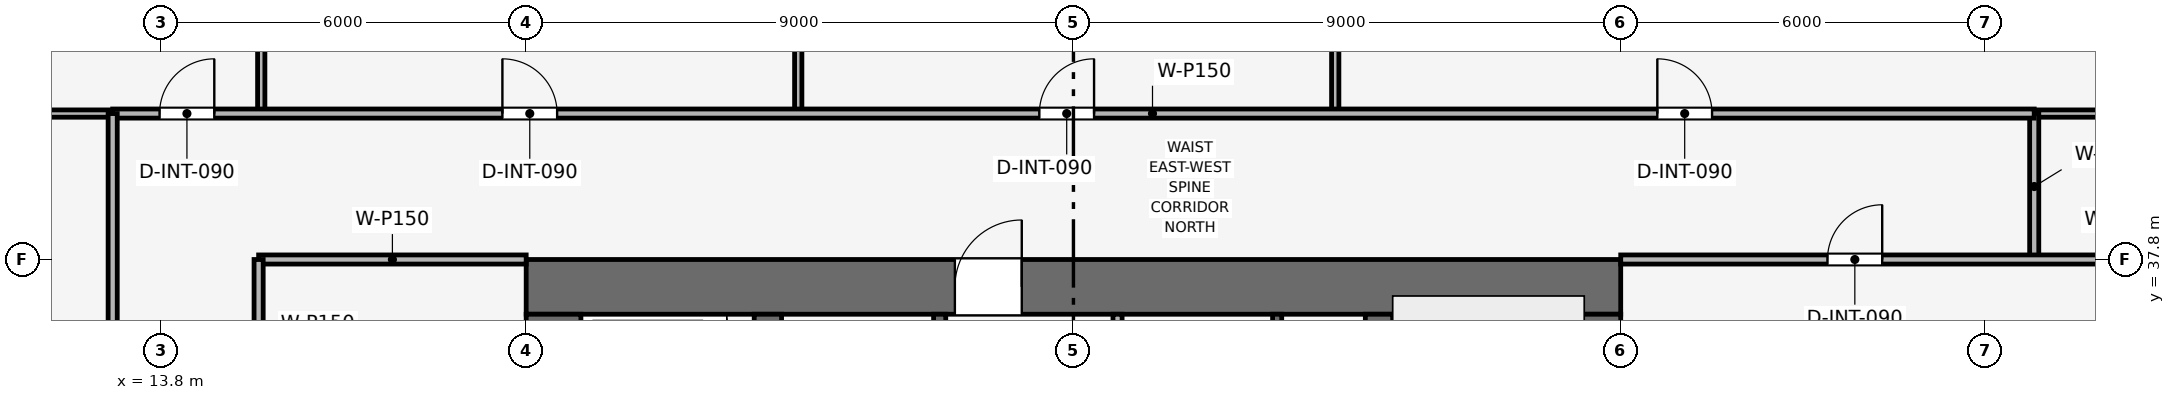
"""IFC4 building model, lengths in metres.
Left out: names, types, materials, properties, quantities, classifications, styles, units other than length and angle.
Written with IfcOpenShell. Run it as: python <this file> out.ifc"""

import sys

from ifc_helpers import new_model, si_unit, direction, frame, frame_2d, origin, place, context, subcontext, project, spatial, rectangle, extrude, element, fill, save


model = new_model("IFC4")
c1 = context("Model", 3, precision=1e-05, world=origin(), true_north=direction((0.0, 1.0)))
c2 = subcontext(c1, "Body", "Model", "MODEL_VIEW")
j1 = project(units=[si_unit("LENGTHUNIT", "METRE"), si_unit("PLANEANGLEUNIT", "RADIAN")], contexts=[c1])
p1 = place(None, origin())
s1 = spatial("IfcSite", under=j1, at=p1, CompositionType="ELEMENT")
p2 = place(p1, origin())
s2 = spatial("IfcBuilding", under=s1, at=p2, CompositionType="ELEMENT")
p3 = place(p2, frame((0.0, 0.0, 145.8)))
s3 = spatial("IfcBuildingStorey", under=s2, at=p3, CompositionType="ELEMENT", Elevation=145.8)
p4 = place(p3, frame((19.8, 37.35, 0.0), z_axis=(0.0, 0.0, 1.0), x_axis=(1.0, 0.0, 0.0)))
e1 = element("IfcWall", 1, at=p4, inside=s3, PredefinedType="SHEAR", context=c2, shape_type="SweptSolid", body=[
    extrude(rectangle(XDim=18.0, YDim=0.9, at=frame_2d((9.0, 0.0))), origin(), (0.0, 0.0, 1.0), 3.75),
])
p5 = place(p4, frame((7.05, 0.0, 0.0)))
e2 = element("IfcOpeningElement", 2, at=p5, cuts=e1, PredefinedType="OPENING", context=c2, shape_type="SweptSolid", body=[
    extrude(rectangle(XDim=1.1, YDim=2.15, at=frame_2d((0.55, 1.075))), frame((0.0, 0.46, 0.0), z_axis=(0.0, -1.0, 0.0), x_axis=(1.0, 0.0, 0.0)), (0.0, 0.0, 1.0), 0.92),
])
p6 = place(p3, frame((20.25, 20.7, 0.0), z_axis=(0.0, 0.0, 1.0), x_axis=(0.0, 1.0, 0.0)))
e3 = element("IfcWall", 3, at=p6, inside=s3, PredefinedType="SHEAR", context=c2, shape_type="SweptSolid", body=[
    extrude(rectangle(XDim=16.2, YDim=0.9, at=frame_2d((8.1, 0.0))), origin(), (0.0, 0.0, 1.0), 3.75),
])
p7 = place(p6, frame((10.1, 0.0, 0.0)))
e4 = element("IfcOpeningElement", 4, at=p7, cuts=e3, PredefinedType="OPENING", context=c2, shape_type="SweptSolid", body=[
    extrude(rectangle(XDim=1.1, YDim=2.15, at=frame_2d((0.55, 1.075))), frame((0.0, 0.46, 0.0), z_axis=(0.0, -1.0, 0.0), x_axis=(1.0, 0.0, 0.0)), (0.0, 0.0, 1.0), 0.92),
])
p8 = place(p3, frame((37.35, 20.7, 0.0), z_axis=(0.0, 0.0, 1.0), x_axis=(0.0, 1.0, 0.0)))
e5 = element("IfcWall", 5, at=p8, inside=s3, PredefinedType="SHEAR", context=c2, shape_type="SweptSolid", body=[
    extrude(rectangle(XDim=16.2, YDim=0.9, at=frame_2d((8.1, 0.0))), origin(), (0.0, 0.0, 1.0), 3.75),
])
p9 = place(p8, frame((4.6, 0.0, 0.0)))
e6 = element("IfcOpeningElement", 6, at=p9, cuts=e5, PredefinedType="OPENING", context=c2, shape_type="SweptSolid", body=[
    extrude(rectangle(XDim=1.1, YDim=2.15, at=frame_2d((0.55, 1.075))), frame((0.0, 0.46, 0.0), z_axis=(0.0, -1.0, 0.0), x_axis=(1.0, 0.0, 0.0)), (0.0, 0.0, 1.0), 0.92),
])
for number, where, z_axis, x_axis in (
    (7, (23.775, 20.7, 0.0), (0.0, 0.0, 1.0), (0.0, 1.0, 0.0)),
    (8, (33.825, 20.7, 0.0), (0.0, 0.0, 1.0), (0.0, 1.0, 0.0)),
):
    element("IfcWall", number, at=place(p3, frame(where, z_axis=z_axis, x_axis=x_axis)), inside=s3, PredefinedType="SHEAR", context=c2, shape_type="SweptSolid", body=[
        extrude(rectangle(XDim=16.2, YDim=0.45, at=frame_2d((8.1, 0.0))), origin(), (0.0, 0.0, 1.0), 3.75),
    ])
p10 = place(p3, frame((32.15, 34.0, 0.0), z_axis=(0.0, 0.0, 1.0), x_axis=(0.0, 1.0, 0.0)))
e9 = element("IfcWall", 9, at=p10, inside=s3, PredefinedType="SHEAR", context=c2, shape_type="SweptSolid", body=[
    extrude(rectangle(XDim=2.9, YDim=0.15, at=frame_2d((1.45, 0.0))), origin(), (0.0, 0.0, 1.0), 3.495),
])
p11 = place(p3, frame((26.6, 34.0, 0.0), z_axis=(0.0, 0.0, 1.0), x_axis=(0.0, 1.0, 0.0)))
e10 = element("IfcWall", 10, at=p11, inside=s3, PredefinedType="SHEAR", context=c2, shape_type="SweptSolid", body=[
    extrude(rectangle(XDim=2.9, YDim=0.2, at=frame_2d((1.45, 0.0))), origin(), (0.0, 0.0, 1.0), 3.495),
])
p12 = place(p11, frame((0.75, 0.0, 0.0)))
e11 = element("IfcOpeningElement", 11, at=p12, cuts=e10, PredefinedType="OPENING", context=c2, shape_type="SweptSolid", body=[
    extrude(rectangle(XDim=1.1, YDim=2.15, at=frame_2d((0.55, 1.075))), frame((0.0, 0.11, 0.0), z_axis=(0.0, -1.0, 0.0), x_axis=(1.0, 0.0, 0.0)), (0.0, 0.0, 1.0), 0.22),
])
p13 = place(p3, frame((29.525, 33.925, 0.0), z_axis=(0.0, 0.0, 1.0), x_axis=(0.0, 1.0, 0.0)))
e12 = element("IfcWall", 12, at=p13, inside=s3, PredefinedType="PARTITIONING", context=c2, shape_type="SweptSolid", body=[
    extrude(rectangle(XDim=2.975, YDim=0.15, at=frame_2d((1.487, 0.0))), origin(), (0.0, 0.0, 1.0), 3.495),
])
p14 = place(p13, frame((0.85, 0.0, 0.0)))
e13 = element("IfcOpeningElement", 13, at=p14, cuts=e12, PredefinedType="OPENING", context=c2, shape_type="SweptSolid", body=[
    extrude(rectangle(XDim=0.9, YDim=2.1, at=frame_2d((0.45, 1.05))), frame((0.0, 0.085, 0.0), z_axis=(0.0, -1.0, 0.0), x_axis=(1.0, 0.0, 0.0)), (0.0, 0.0, 1.0), 0.17),
])
p15 = place(p3, frame((15.4, 37.8, 0.0), z_axis=(0.0, 0.0, 1.0), x_axis=(1.0, 0.0, 0.0)))
e14 = element("IfcWall", 14, at=p15, inside=s3, PredefinedType="PARTITIONING", context=c2, shape_type="SweptSolid", body=[
    extrude(rectangle(XDim=4.4, YDim=0.15, at=frame_2d((2.2, 0.0))), origin(), (0.0, 0.0, 1.0), 3.03),
])
p16 = place(p3, frame((15.4, 32.45, 0.0), z_axis=(0.0, 0.0, 1.0), x_axis=(0.0, 1.0, 0.0)))
e15 = element("IfcWall", 15, at=p16, inside=s3, PredefinedType="PARTITIONING", context=c2, shape_type="SweptSolid", body=[
    extrude(rectangle(XDim=5.35, YDim=0.15, at=frame_2d((2.675, 0.0))), origin(), (0.0, 0.0, 1.0), 3.03),
])
p17 = place(p16, frame((2.1, 0.0, 0.0)))
e16 = element("IfcOpeningElement", 16, at=p17, cuts=e15, PredefinedType="OPENING", context=c2, shape_type="SweptSolid", body=[
    extrude(rectangle(XDim=0.9, YDim=2.1, at=frame_2d((0.45, 1.05))), frame((0.0, 0.085, 0.0), z_axis=(0.0, -1.0, 0.0), x_axis=(1.0, 0.0, 0.0)), (0.0, 0.0, 1.0), 0.17),
])
for number, where, z_axis, x_axis in (
    (17, (15.443, 40.2, 0.0), (0.0, 0.0, 1.0), (0.0, 1.0, 0.0)),
    (18, (24.274, 40.2, 0.0), (0.0, 0.0, 1.0), (0.0, 1.0, 0.0)),
    (19, (33.105, 40.2, 0.0), (0.0, 0.0, 1.0), (0.0, 1.0, 0.0)),
):
    element("IfcWall", number, at=place(p3, frame(where, z_axis=z_axis, x_axis=x_axis)), inside=s3, PredefinedType="PARTITIONING", context=c2, shape_type="SweptSolid", body=[
        extrude(rectangle(XDim=12.77, YDim=0.12, at=frame_2d((6.385, 0.0))), origin(), (0.0, 0.0, 1.0), 2.98),
    ])
p18 = place(p3, frame((4.63, 40.2, 0.0), z_axis=(0.0, 0.0, 1.0), x_axis=(1.0, 0.0, 0.0)))
e20 = element("IfcWall", 20, at=p18, inside=s3, PredefinedType="PARTITIONING", context=c2, shape_type="SweptSolid", body=[
    extrude(rectangle(XDim=8.37, YDim=0.12, at=frame_2d((4.185, 0.0))), origin(), (0.0, 0.0, 1.0), 2.98),
])
p19 = place(p3, frame((44.6, 40.2, 0.0), z_axis=(0.0, 0.0, 1.0), x_axis=(1.0, 0.0, 0.0)))
e21 = element("IfcWall", 21, at=p19, inside=s3, PredefinedType="PARTITIONING", context=c2, shape_type="SweptSolid", body=[
    extrude(rectangle(XDim=8.37, YDim=0.12, at=frame_2d((4.185, 0.0))), origin(), (0.0, 0.0, 1.0), 2.98),
])
p20 = place(p3, frame((44.6, 37.8, 0.0), z_axis=(0.0, 0.0, 1.0), x_axis=(0.0, 1.0, 0.0)))
e22 = element("IfcWall", 22, at=p20, inside=s3, PredefinedType="PARTITIONING", context=c2, shape_type="SweptSolid", body=[
    extrude(rectangle(XDim=2.4, YDim=0.15, at=frame_2d((1.2, 0.0))), origin(), (0.0, 0.0, 1.0), 3.495),
])
p21 = place(p3, frame((37.8, 37.8, 0.0), z_axis=(0.0, 0.0, 1.0), x_axis=(1.0, 0.0, 0.0)))
e23 = element("IfcWall", 23, at=p21, inside=s3, PredefinedType="PARTITIONING", context=c2, shape_type="SweptSolid", body=[
    extrude(rectangle(XDim=15.17, YDim=0.15, at=frame_2d((7.585, 0.0))), origin(), (0.0, 0.0, 1.0), 2.98),
])
p22 = place(p21, frame((3.4, 0.0, 0.0)))
e24 = element("IfcOpeningElement", 24, at=p22, cuts=e23, PredefinedType="OPENING", context=c2, shape_type="SweptSolid", body=[
    extrude(rectangle(XDim=0.9, YDim=2.1, at=frame_2d((0.45, 1.05))), frame((0.0, 0.085, 0.0), z_axis=(0.0, -1.0, 0.0), x_axis=(1.0, 0.0, 0.0)), (0.0, 0.0, 1.0), 0.17),
])
p23 = place(p3, frame((13.0, 40.2, 0.0), z_axis=(0.0, 0.0, 1.0), x_axis=(1.0, 0.0, 0.0)))
e25 = element("IfcWall", 25, at=p23, inside=s3, PredefinedType="PARTITIONING", context=c2, shape_type="SweptSolid", body=[
    extrude(rectangle(XDim=31.6, YDim=0.15, at=frame_2d((15.8, 0.0))), origin(), (0.0, 0.0, 1.0), 3.03),
])
p24 = place(p23, frame((0.771, 0.0, 0.0)))
e26 = element("IfcOpeningElement", 26, at=p24, cuts=e25, PredefinedType="OPENING", context=c2, shape_type="SweptSolid", body=[
    extrude(rectangle(XDim=0.9, YDim=2.1, at=frame_2d((0.45, 1.05))), frame((0.0, 0.085, 0.0), z_axis=(0.0, -1.0, 0.0), x_axis=(1.0, 0.0, 0.0)), (0.0, 0.0, 1.0), 0.17),
])
p25 = place(p23, frame((6.409, 0.0, 0.0)))
e27 = element("IfcOpeningElement", 27, at=p25, cuts=e25, PredefinedType="OPENING", context=c2, shape_type="SweptSolid", body=[
    extrude(rectangle(XDim=0.9, YDim=2.1, at=frame_2d((0.45, 1.05))), frame((0.0, 0.085, 0.0), z_axis=(0.0, -1.0, 0.0), x_axis=(1.0, 0.0, 0.0)), (0.0, 0.0, 1.0), 0.17),
])
p26 = place(p23, frame((15.239, 0.0, 0.0)))
e28 = element("IfcOpeningElement", 28, at=p26, cuts=e25, PredefinedType="OPENING", context=c2, shape_type="SweptSolid", body=[
    extrude(rectangle(XDim=0.9, YDim=2.1, at=frame_2d((0.45, 1.05))), frame((0.0, 0.085, 0.0), z_axis=(0.0, -1.0, 0.0), x_axis=(1.0, 0.0, 0.0)), (0.0, 0.0, 1.0), 0.17),
])
p27 = place(p23, frame((25.402, 0.0, 0.0)))
e29 = element("IfcOpeningElement", 29, at=p27, cuts=e25, PredefinedType="OPENING", context=c2, shape_type="SweptSolid", body=[
    extrude(rectangle(XDim=0.9, YDim=2.1, at=frame_2d((0.45, 1.05))), frame((0.0, 0.085, 0.0), z_axis=(0.0, -1.0, 0.0), x_axis=(1.0, 0.0, 0.0)), (0.0, 0.0, 1.0), 0.17),
])
p28 = place(p3, frame((13.0, 17.4, 0.0), z_axis=(0.0, 0.0, 1.0), x_axis=(0.0, 1.0, 0.0)))
e30 = element("IfcWall", 30, at=p28, inside=s3, PredefinedType="PARTITIONING", context=c2, shape_type="SweptSolid", body=[
    extrude(rectangle(XDim=22.8, YDim=0.15, at=frame_2d((11.4, 0.0))), origin(), (0.0, 0.0, 1.0), 3.03),
])
p29 = place(p28, frame((6.115, 0.0, 0.0)))
e31 = element("IfcOpeningElement", 31, at=p29, cuts=e30, PredefinedType="OPENING", context=c2, shape_type="SweptSolid", body=[
    extrude(rectangle(XDim=0.9, YDim=2.1, at=frame_2d((0.45, 1.05))), frame((0.0, 0.085, 0.0), z_axis=(0.0, -1.0, 0.0), x_axis=(1.0, 0.0, 0.0)), (0.0, 0.0, 1.0), 0.17),
])
p30 = place(p28, frame((15.115, 0.0, 0.0)))
e32 = element("IfcOpeningElement", 32, at=p30, cuts=e30, PredefinedType="OPENING", context=c2, shape_type="SweptSolid", body=[
    extrude(rectangle(XDim=0.9, YDim=2.1, at=frame_2d((0.45, 1.05))), frame((0.0, 0.085, 0.0), z_axis=(0.0, -1.0, 0.0), x_axis=(1.0, 0.0, 0.0)), (0.0, 0.0, 1.0), 0.17),
])
p31 = place(p22, origin())
e33 = element("IfcDoor", 33, at=p31, inside=s3, OperationType="SINGLE_SWING_RIGHT", PredefinedType="DOOR", context=c2, shape_type="SweptSolid", body=[
    extrude(rectangle(XDim=0.9, YDim=2.1, at=frame_2d((0.45, 1.05))), frame((0.0, 0.025, 0.0), z_axis=(0.0, -1.0, 0.0), x_axis=(1.0, 0.0, 0.0)), (0.0, 0.0, 1.0), 0.05),
])
fill(e24, e33)
p32 = place(p24, origin())
e34 = element("IfcDoor", 34, at=p32, inside=s3, OperationType="SINGLE_SWING_RIGHT", PredefinedType="DOOR", context=c2, shape_type="SweptSolid", body=[
    extrude(rectangle(XDim=0.9, YDim=2.1, at=frame_2d((0.45, 1.05))), frame((0.0, 0.025, 0.0), z_axis=(0.0, -1.0, 0.0), x_axis=(1.0, 0.0, 0.0)), (0.0, 0.0, 1.0), 0.05),
])
fill(e26, e34)
p33 = place(p25, origin())
e35 = element("IfcDoor", 35, at=p33, inside=s3, OperationType="SINGLE_SWING_LEFT", PredefinedType="DOOR", context=c2, shape_type="SweptSolid", body=[
    extrude(rectangle(XDim=0.9, YDim=2.1, at=frame_2d((0.45, 1.05))), frame((0.0, 0.025, 0.0), z_axis=(0.0, -1.0, 0.0), x_axis=(1.0, 0.0, 0.0)), (0.0, 0.0, 1.0), 0.05),
])
fill(e27, e35)
p34 = place(p26, origin())
e36 = element("IfcDoor", 36, at=p34, inside=s3, OperationType="SINGLE_SWING_RIGHT", PredefinedType="DOOR", context=c2, shape_type="SweptSolid", body=[
    extrude(rectangle(XDim=0.9, YDim=2.1, at=frame_2d((0.45, 1.05))), frame((0.0, 0.025, 0.0), z_axis=(0.0, -1.0, 0.0), x_axis=(1.0, 0.0, 0.0)), (0.0, 0.0, 1.0), 0.05),
])
fill(e28, e36)
p35 = place(p27, origin())
e37 = element("IfcDoor", 37, at=p35, inside=s3, OperationType="SINGLE_SWING_LEFT", PredefinedType="DOOR", context=c2, shape_type="SweptSolid", body=[
    extrude(rectangle(XDim=0.9, YDim=2.1, at=frame_2d((0.45, 1.05))), frame((0.0, 0.025, 0.0), z_axis=(0.0, -1.0, 0.0), x_axis=(1.0, 0.0, 0.0)), (0.0, 0.0, 1.0), 0.05),
])
fill(e29, e37)
p36 = place(p5, origin())
e38 = element("IfcDoor", 38, at=p36, inside=s3, OperationType="SINGLE_SWING_RIGHT", PredefinedType="DOOR", context=c2, shape_type="SweptSolid", body=[
    extrude(rectangle(XDim=1.1, YDim=2.15, at=frame_2d((0.55, 1.075))), frame((0.0, 0.025, 0.0), z_axis=(0.0, -1.0, 0.0), x_axis=(1.0, 0.0, 0.0)), (0.0, 0.0, 1.0), 0.05),
])
fill(e2, e38)
save(model, sys.argv[1])
